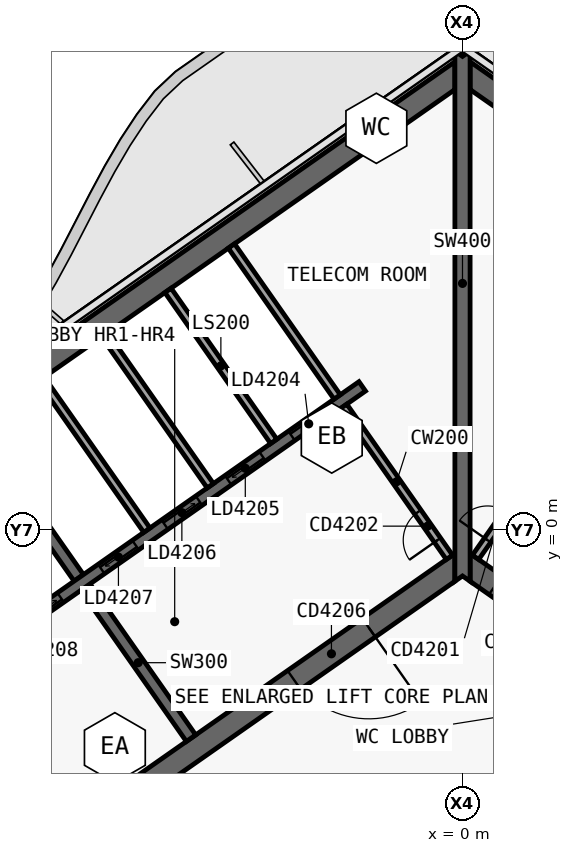
"""IFC4 building model, lengths in metres.
Left out: names, types, materials, properties, quantities, classifications, styles, units other than length and angle.
Written with IfcOpenShell. Run it as: python <this file> out.ifc"""

import sys

from ifc_helpers import new_model, si_unit, direction, frame, frame_2d, origin, place, context, subcontext, project, spatial, polyline, rectangle, outline, extrude, element, fill, save


model = new_model("IFC4")
c1 = context("Model", 3, precision=1e-05, world=origin(), true_north=direction((0.0, 1.0)))
c2 = subcontext(c1, "Body", "Model", "MODEL_VIEW")
j1 = project(units=[si_unit("LENGTHUNIT", "METRE"), si_unit("PLANEANGLEUNIT", "RADIAN")], contexts=[c1])
p1 = place(None, origin())
s1 = spatial("IfcSite", under=j1, at=p1, CompositionType="ELEMENT")
p2 = place(p1, origin())
s2 = spatial("IfcBuilding", under=s1, at=p2, CompositionType="ELEMENT")
p3 = place(p2, frame((0.0, 0.0, 229.3)))
s3 = spatial("IfcBuildingStorey", under=s2, at=p3, CompositionType="ELEMENT", Elevation=229.3)
p4 = place(p3, frame((-0.028, 12.066, 0.0), z_axis=(0.0, 0.0, 1.0), x_axis=(-0.819151382952, -0.573577380837, 0.0)))
e1 = element("IfcWall", 1, at=p4, inside=s3, PredefinedType="SHEAR", context=c2, shape_type="SweptSolid", body=[
    extrude(outline(polyline([(33.898, 0.3), (0.42, 0.3), (0.0, -0.3), (33.898, -0.3), (33.898, 0.3)])), origin(), (0.0, 0.0, 1.0), 3.9),
])
p5 = place(p3, frame((-0.028, -0.874, 0.0), z_axis=(0.0, 0.0, 1.0), x_axis=(-0.819150035022, -0.573579305871, 0.0)))
e2 = element("IfcWall", 2, at=p5, inside=s3, PredefinedType="SHEAR", context=c2, shape_type="SweptSolid", body=[
    extrude(outline(polyline([(26.476, 0.3), (0.42, 0.3), (0.0, -0.3), (26.476, -0.3), (26.476, 0.3)])), origin(), (0.0, 0.0, 1.0), 3.9),
])
p6 = place(p5, frame((2.976, 0.0, 0.0)))
e3 = element("IfcOpeningElement", 3, at=p6, cuts=e2, PredefinedType="OPENING", context=c2, shape_type="SweptSolid", body=[
    extrude(rectangle(XDim=2.4, YDim=2.1, at=frame_2d((1.2, 1.05))), frame((0.0, 0.31, 0.0), z_axis=(0.0, -1.0, 0.0), x_axis=(1.0, 0.0, 0.0)), (0.0, 0.0, 1.0), 0.62),
])
p7 = place(p5, frame((11.776, 0.0, 0.0)))
e4 = element("IfcOpeningElement", 4, at=p7, cuts=e2, PredefinedType="OPENING", context=c2, shape_type="SweptSolid", body=[
    extrude(rectangle(XDim=2.4, YDim=2.1, at=frame_2d((1.2, 1.05))), frame((0.0, 0.31, 0.0), z_axis=(0.0, -1.0, 0.0), x_axis=(1.0, 0.0, 0.0)), (0.0, 0.0, 1.0), 0.62),
])
p8 = place(p3, frame((-7.143, -5.49, 0.0), z_axis=(0.0, 0.0, 1.0), x_axis=(-0.573617744349, 0.819123118565, 0.0)))
e5 = element("IfcWall", 5, at=p8, inside=s3, PredefinedType="SHEAR", context=c2, shape_type="SweptSolid", body=[
    extrude(outline(polyline([(4.85, 0.15), (0.0, 0.15), (0.0, -0.15), (4.85, -0.15), (4.85, 0.15)])), origin(), (0.0, 0.0, 1.0), 3.9),
])
p9 = place(p3, frame((-10.097, -1.271, 0.0), z_axis=(0.0, 0.0, 1.0), x_axis=(-0.573560315113, 0.819163332265, 0.0)))
e6 = element("IfcWall", 6, at=p9, inside=s3, PredefinedType="SHEAR", context=c2, shape_type="SweptSolid", body=[
    extrude(outline(polyline([(4.85, -0.15), (4.85, 0.15), (0.0, 0.15), (0.0, -0.15), (4.85, -0.15)])), origin(), (0.0, 0.0, 1.0), 3.9),
])
p10 = place(p3, frame((-2.638, 3.768, 0.0), z_axis=(0.0, 0.0, 1.0), x_axis=(-0.819155014212, -0.573572194837, 0.0)))
e7 = element("IfcWall", 7, at=p10, inside=s3, PredefinedType="SHEAR", context=c2, shape_type="SweptSolid", body=[
    extrude(outline(polyline([(26.4, 0.15), (0.0, 0.15), (0.0, -0.15), (26.4, -0.15), (26.4, 0.15)])), origin(), (0.0, 0.0, 1.0), 3.9),
])
p11 = place(p10, frame((1.169, 0.0, 0.0)))
e8 = element("IfcOpeningElement", 8, at=p11, cuts=e7, PredefinedType="OPENING", context=c2, shape_type="SweptSolid", body=[
    extrude(rectangle(XDim=1.1, YDim=2.1, at=frame_2d((0.55, 1.05))), frame((0.0, 0.16, 0.0), z_axis=(0.0, -1.0, 0.0), x_axis=(1.0, 0.0, 0.0)), (0.0, 0.0, 1.0), 0.32),
])
p12 = place(p10, frame((3.206, 0.0, 0.0)))
e9 = element("IfcOpeningElement", 9, at=p12, cuts=e7, PredefinedType="OPENING", context=c2, shape_type="SweptSolid", body=[
    extrude(rectangle(XDim=1.1, YDim=2.1, at=frame_2d((0.55, 1.05))), frame((0.0, 0.16, 0.0), z_axis=(0.0, -1.0, 0.0), x_axis=(1.0, 0.0, 0.0)), (0.0, 0.0, 1.0), 0.32),
])
p13 = place(p10, frame((5.244, 0.0, 0.0)))
e10 = element("IfcOpeningElement", 10, at=p13, cuts=e7, PredefinedType="OPENING", context=c2, shape_type="SweptSolid", body=[
    extrude(rectangle(XDim=1.1, YDim=2.1, at=frame_2d((0.55, 1.05))), frame((0.0, 0.16, 0.0), z_axis=(0.0, -1.0, 0.0), x_axis=(1.0, 0.0, 0.0)), (0.0, 0.0, 1.0), 0.32),
])
p14 = place(p10, frame((7.281, 0.0, 0.0)))
e11 = element("IfcOpeningElement", 11, at=p14, cuts=e7, PredefinedType="OPENING", context=c2, shape_type="SweptSolid", body=[
    extrude(rectangle(XDim=1.1, YDim=2.1, at=frame_2d((0.55, 1.05))), frame((0.0, 0.16, 0.0), z_axis=(0.0, -1.0, 0.0), x_axis=(1.0, 0.0, 0.0)), (0.0, 0.0, 1.0), 0.32),
])
p15 = place(p10, frame((9.688, 0.0, 0.0)))
e12 = element("IfcOpeningElement", 12, at=p15, cuts=e7, PredefinedType="OPENING", context=c2, shape_type="SweptSolid", body=[
    extrude(rectangle(XDim=1.1, YDim=2.1, at=frame_2d((0.55, 1.05))), frame((0.0, 0.16, 0.0), z_axis=(0.0, -1.0, 0.0), x_axis=(1.0, 0.0, 0.0)), (0.0, 0.0, 1.0), 0.32),
])
p16 = place(p10, frame((11.863, 0.0, 0.0)))
e13 = element("IfcOpeningElement", 13, at=p16, cuts=e7, PredefinedType="OPENING", context=c2, shape_type="SweptSolid", body=[
    extrude(rectangle(XDim=1.1, YDim=2.1, at=frame_2d((0.55, 1.05))), frame((0.0, 0.16, 0.0), z_axis=(0.0, -1.0, 0.0), x_axis=(1.0, 0.0, 0.0)), (0.0, 0.0, 1.0), 0.32),
])
p17 = place(p10, frame((13.722, 0.0, 0.0)))
e14 = element("IfcOpeningElement", 14, at=p17, cuts=e7, PredefinedType="OPENING", context=c2, shape_type="SweptSolid", body=[
    extrude(rectangle(XDim=1.0, YDim=2.1, at=frame_2d((0.5, 1.05))), frame((0.0, 0.16, 0.0), z_axis=(0.0, -1.0, 0.0), x_axis=(1.0, 0.0, 0.0)), (0.0, 0.0, 1.0), 0.32),
])
p18 = place(p10, frame((15.798, 0.0, 0.0)))
e15 = element("IfcOpeningElement", 15, at=p18, cuts=e7, PredefinedType="OPENING", context=c2, shape_type="SweptSolid", body=[
    extrude(rectangle(XDim=1.0, YDim=2.1, at=frame_2d((0.5, 1.05))), frame((0.0, 0.16, 0.0), z_axis=(0.0, -1.0, 0.0), x_axis=(1.0, 0.0, 0.0)), (0.0, 0.0, 1.0), 0.32),
])
p19 = place(p3, frame((0.028, 12.066, 0.0), z_axis=(0.0, 0.0, 1.0), x_axis=(0.819151382952, -0.573577380837, 0.0)))
e16 = element("IfcWall", 16, at=p19, inside=s3, PredefinedType="SHEAR", context=c2, shape_type="SweptSolid", body=[
    extrude(outline(polyline([(33.898, 0.3), (0.0, 0.3), (0.42, -0.3), (33.898, -0.3), (33.898, 0.3)])), origin(), (0.0, 0.0, 1.0), 3.9),
])
p20 = place(p3, frame((0.028, -0.874, 0.0), z_axis=(0.0, 0.0, 1.0), x_axis=(0.819150035022, -0.573579305871, 0.0)))
e17 = element("IfcWall", 17, at=p20, inside=s3, PredefinedType="SHEAR", context=c2, shape_type="SweptSolid", body=[
    extrude(outline(polyline([(26.476, 0.3), (0.0, 0.3), (0.42, -0.3), (26.476, -0.3), (26.476, 0.3)])), origin(), (0.0, 0.0, 1.0), 3.9),
])
p21 = place(p20, frame((1.026, 0.0, 0.0)))
e18 = element("IfcOpeningElement", 18, at=p21, cuts=e17, PredefinedType="OPENING", context=c2, shape_type="SweptSolid", body=[
    extrude(rectangle(XDim=1.5, YDim=2.1, at=frame_2d((0.75, 1.05))), frame((0.0, 0.31, 0.0), z_axis=(0.0, -1.0, 0.0), x_axis=(1.0, 0.0, 0.0)), (0.0, 0.0, 1.0), 0.62),
])
p22 = place(p20, frame((12.226, 0.0, 0.0)))
e19 = element("IfcOpeningElement", 19, at=p22, cuts=e17, PredefinedType="OPENING", context=c2, shape_type="SweptSolid", body=[
    extrude(rectangle(XDim=1.5, YDim=2.1, at=frame_2d((0.75, 1.05))), frame((0.0, 0.31, 0.0), z_axis=(0.0, -1.0, 0.0), x_axis=(1.0, 0.0, 0.0)), (0.0, 0.0, 1.0), 0.62),
])
p23 = place(p3, frame((0.0, -1.361, 0.0), z_axis=(0.0, 0.0, 1.0), x_axis=(0.0, 1.0, 0.0)))
e20 = element("IfcWall", 20, at=p23, inside=s3, PredefinedType="SHEAR", context=c2, shape_type="SweptSolid", body=[
    extrude(outline(polyline([(0.14, 0.2), (0.0, 0.2), (0.14, 0.0), (0.0, -0.2), (0.14, -0.2), (1.012, -0.2), (12.94, -0.2), (13.813, -0.2), (13.893, -0.2), (13.933, -0.172), (13.813, 0.0), (13.933, 0.172), (13.893, 0.2), (13.813, 0.2), (12.94, 0.2), (1.012, 0.2), (0.14, 0.2)])), origin(), (0.0, 0.0, 1.0), 3.9),
])
p24 = place(p3, frame((-4.967, 2.321, 0.0), z_axis=(0.0, 0.0, 1.0), x_axis=(-0.573594092424, 0.81913968109, 0.0)))
e21 = element("IfcWall", 21, at=p24, inside=s3, PredefinedType="SOLIDWALL", context=c2, shape_type="SweptSolid", body=[
    extrude(rectangle(XDim=4.85, YDim=0.2, at=frame_2d((2.425, 0.0))), origin(), (0.0, 0.0, 1.0), 3.9),
])
p25 = place(p3, frame((-6.636, 1.152, 0.0), z_axis=(0.0, 0.0, 1.0), x_axis=(-0.573560315113, 0.819163332265, 0.0)))
e22 = element("IfcWall", 22, at=p25, inside=s3, PredefinedType="SOLIDWALL", context=c2, shape_type="SweptSolid", body=[
    extrude(rectangle(XDim=4.85, YDim=0.2, at=frame_2d((2.425, 0.0))), origin(), (0.0, 0.0, 1.0), 3.9),
])
p26 = place(p3, frame((-8.305, -0.017, 0.0), z_axis=(0.0, 0.0, 1.0), x_axis=(-0.573594092424, 0.81913968109, 0.0)))
e23 = element("IfcWall", 23, at=p26, inside=s3, PredefinedType="SOLIDWALL", context=c2, shape_type="SweptSolid", body=[
    extrude(rectangle(XDim=4.85, YDim=0.2, at=frame_2d((2.425, 0.0))), origin(), (0.0, 0.0, 1.0), 3.9),
])
p27 = place(p3, frame((-0.344, -0.729, 0.0), z_axis=(0.0, 0.0, 1.0), x_axis=(-0.573560315113, 0.819163332265, 0.0)))
e24 = element("IfcWall", 24, at=p27, inside=s3, PredefinedType="SOLIDWALL", context=c2, shape_type="SweptSolid", body=[
    extrude(rectangle(XDim=4.85, YDim=0.2, at=frame_2d((2.425, 0.0))), origin(), (0.0, 0.0, 1.0), 3.62),
])
p28 = place(p27, frame((0.55, 0.0, 0.0)))
e25 = element("IfcOpeningElement", 25, at=p28, cuts=e24, PredefinedType="OPENING", context=c2, shape_type="SweptSolid", body=[
    extrude(rectangle(XDim=0.9, YDim=2.1, at=frame_2d((0.45, 1.05))), frame((0.0, 0.11, 0.0), z_axis=(0.0, -1.0, 0.0), x_axis=(1.0, 0.0, 0.0)), (0.0, 0.0, 1.0), 0.22),
])
p29 = place(p3, frame((-3.298, 3.49, 0.0), z_axis=(0.0, 0.0, 1.0), x_axis=(-0.573560315113, 0.819163332265, 0.0)))
e26 = element("IfcWall", 26, at=p29, inside=s3, PredefinedType="SOLIDWALL", context=c2, shape_type="SweptSolid", body=[
    extrude(rectangle(XDim=4.85, YDim=0.2, at=frame_2d((2.425, 0.0))), origin(), (0.0, 0.0, 1.0), 3.62),
])
p30 = place(p3, frame((0.344, -0.729, 0.0), z_axis=(0.0, 0.0, 1.0), x_axis=(0.573560315113, 0.819163332265, 0.0)))
e27 = element("IfcWall", 27, at=p30, inside=s3, PredefinedType="SOLIDWALL", context=c2, shape_type="SweptSolid", body=[
    extrude(rectangle(XDim=4.85, YDim=0.2, at=frame_2d((2.425, 0.0))), origin(), (0.0, 0.0, 1.0), 3.62),
])
p31 = place(p30, frame((0.55, 0.0, 0.0)))
e28 = element("IfcOpeningElement", 28, at=p31, cuts=e27, PredefinedType="OPENING", context=c2, shape_type="SweptSolid", body=[
    extrude(rectangle(XDim=0.9, YDim=2.1, at=frame_2d((0.45, 1.05))), frame((0.0, 0.11, 0.0), z_axis=(0.0, -1.0, 0.0), x_axis=(1.0, 0.0, 0.0)), (0.0, 0.0, 1.0), 0.22),
])
p32 = place(p11, origin())
e29 = element("IfcDoor", 29, at=p32, inside=s3, OperationType="SLIDING_TO_LEFT", PredefinedType="DOOR", context=c2, shape_type="SweptSolid", body=[
    extrude(rectangle(XDim=1.1, YDim=2.1, at=frame_2d((0.55, 1.05))), frame((0.0, 0.025, 0.0), z_axis=(0.0, -1.0, 0.0), x_axis=(1.0, 0.0, 0.0)), (0.0, 0.0, 1.0), 0.05),
])
fill(e8, e29)
p33 = place(p12, origin())
e30 = element("IfcDoor", 30, at=p33, inside=s3, OperationType="SLIDING_TO_RIGHT", PredefinedType="DOOR", context=c2, shape_type="SweptSolid", body=[
    extrude(rectangle(XDim=1.1, YDim=2.1, at=frame_2d((0.55, 1.05))), frame((0.0, 0.025, 0.0), z_axis=(0.0, -1.0, 0.0), x_axis=(1.0, 0.0, 0.0)), (0.0, 0.0, 1.0), 0.05),
])
fill(e9, e30)
p34 = place(p13, origin())
e31 = element("IfcDoor", 31, at=p34, inside=s3, OperationType="SLIDING_TO_LEFT", PredefinedType="DOOR", context=c2, shape_type="SweptSolid", body=[
    extrude(rectangle(XDim=1.1, YDim=2.1, at=frame_2d((0.55, 1.05))), frame((0.0, 0.025, 0.0), z_axis=(0.0, -1.0, 0.0), x_axis=(1.0, 0.0, 0.0)), (0.0, 0.0, 1.0), 0.05),
])
fill(e10, e31)
p35 = place(p14, origin())
e32 = element("IfcDoor", 32, at=p35, inside=s3, OperationType="SLIDING_TO_RIGHT", PredefinedType="DOOR", context=c2, shape_type="SweptSolid", body=[
    extrude(rectangle(XDim=1.1, YDim=2.1, at=frame_2d((0.55, 1.05))), frame((0.0, 0.025, 0.0), z_axis=(0.0, -1.0, 0.0), x_axis=(1.0, 0.0, 0.0)), (0.0, 0.0, 1.0), 0.05),
])
fill(e11, e32)
p36 = place(p15, origin())
e33 = element("IfcDoor", 33, at=p36, inside=s3, OperationType="SLIDING_TO_LEFT", PredefinedType="DOOR", context=c2, shape_type="SweptSolid", body=[
    extrude(rectangle(XDim=1.1, YDim=2.1, at=frame_2d((0.55, 1.05))), frame((0.0, 0.025, 0.0), z_axis=(0.0, -1.0, 0.0), x_axis=(1.0, 0.0, 0.0)), (0.0, 0.0, 1.0), 0.05),
])
fill(e12, e33)
p37 = place(p6, origin())
e34 = element("IfcDoor", 34, at=p37, inside=s3, OperationType="DOUBLE_DOOR_SINGLE_SWING", PredefinedType="DOOR", context=c2, shape_type="SweptSolid", body=[
    extrude(rectangle(XDim=2.4, YDim=2.1, at=frame_2d((1.2, 1.05))), frame((0.0, 0.025, 0.0), z_axis=(0.0, -1.0, 0.0), x_axis=(1.0, 0.0, 0.0)), (0.0, 0.0, 1.0), 0.05),
])
fill(e3, e34)
p38 = place(p28, origin())
e35 = element("IfcDoor", 35, at=p38, inside=s3, OperationType="SINGLE_SWING_RIGHT", PredefinedType="DOOR", context=c2, shape_type="SweptSolid", body=[
    extrude(rectangle(XDim=0.9, YDim=2.1, at=frame_2d((0.45, 1.05))), frame((0.0, 0.025, 0.0), z_axis=(0.0, -1.0, 0.0), x_axis=(1.0, 0.0, 0.0)), (0.0, 0.0, 1.0), 0.05),
])
fill(e25, e35)
p39 = place(p31, origin())
e36 = element("IfcDoor", 36, at=p39, inside=s3, OperationType="SINGLE_SWING_RIGHT", PredefinedType="DOOR", context=c2, shape_type="SweptSolid", body=[
    extrude(rectangle(XDim=0.9, YDim=2.1, at=frame_2d((0.45, 1.05))), frame((0.0, 0.025, 0.0), z_axis=(0.0, -1.0, 0.0), x_axis=(1.0, 0.0, 0.0)), (0.0, 0.0, 1.0), 0.05),
])
fill(e28, e36)
save(model, sys.argv[1])
